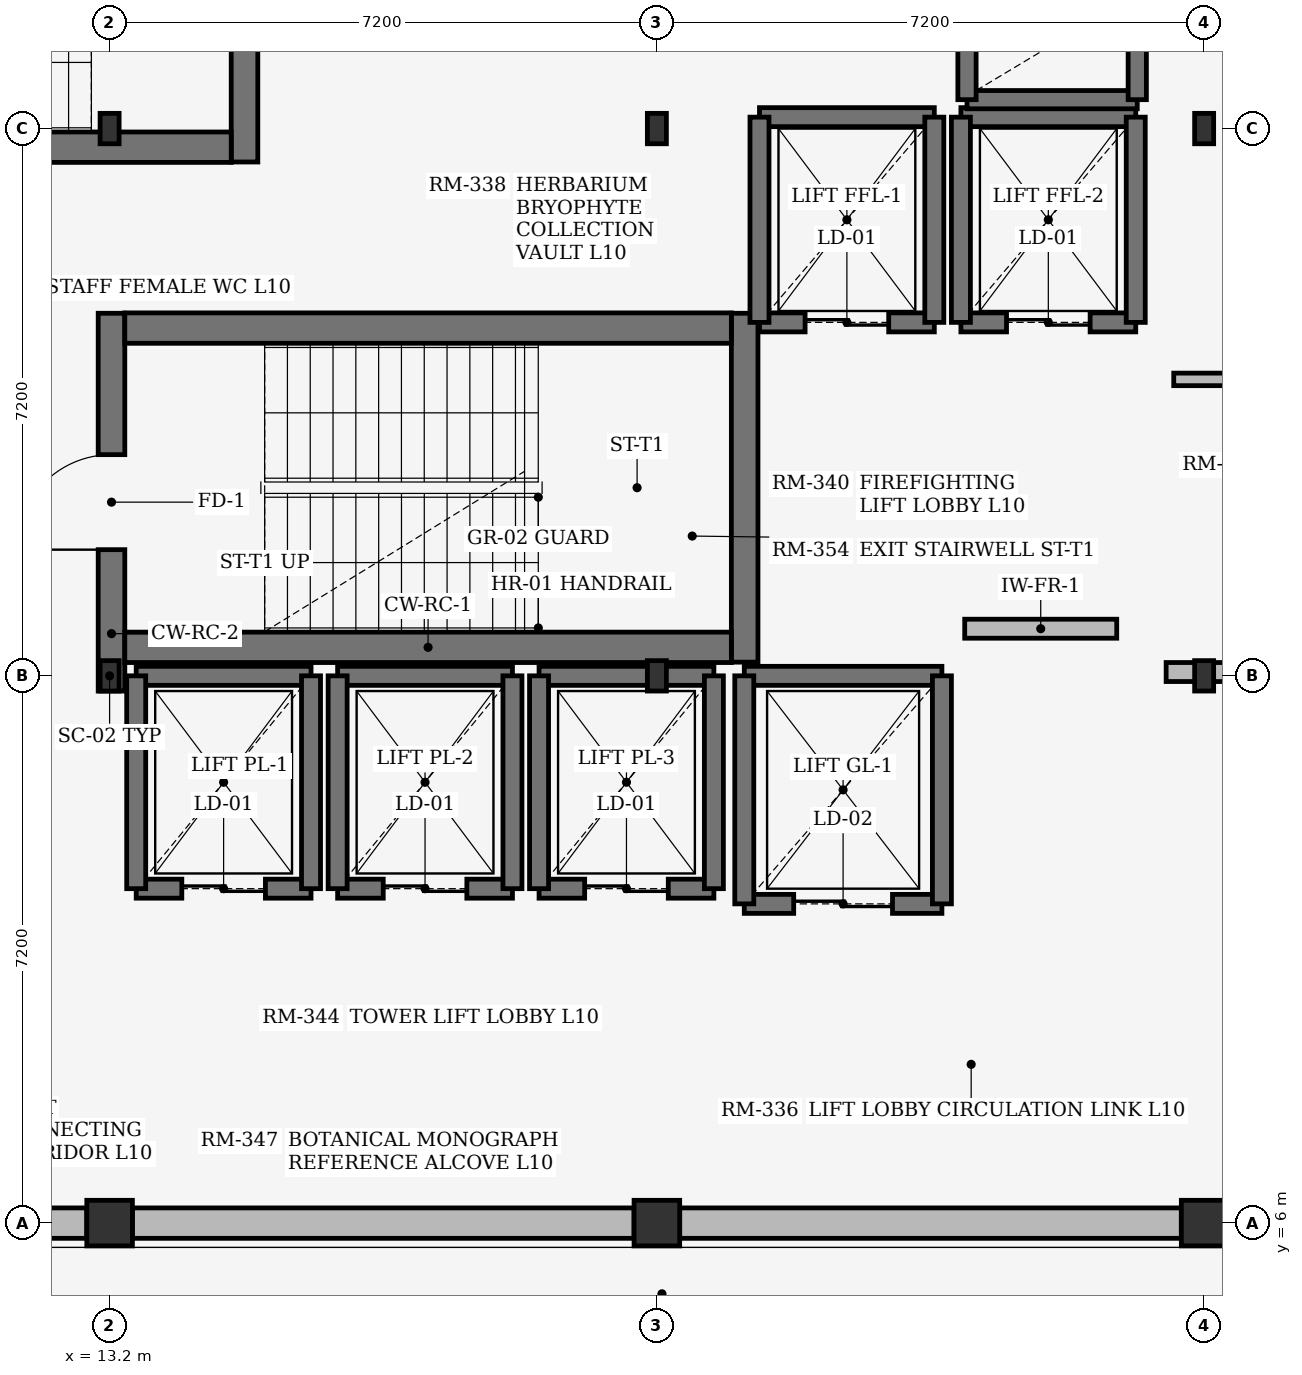
"""IFC4 building model, lengths in metres.
Left out: names, types, materials, properties, quantities, classifications, styles, units other than length and angle.
Written with IfcOpenShell. Run it as: python <this file> out.ifc"""

import sys

from ifc_helpers import new_model, si_unit, direction, frame, frame_2d, origin, origin_2d, place, context, subcontext, project, spatial, rectangle, i_section, extrude, element, fill, save


model = new_model("IFC4")
c1 = context("Model", 3, precision=1e-05, world=origin(), true_north=direction((0.0, 1.0)))
c2 = subcontext(c1, "Body", "Model", "MODEL_VIEW")
j1 = project(units=[si_unit("LENGTHUNIT", "METRE"), si_unit("PLANEANGLEUNIT", "RADIAN")], contexts=[c1])
p1 = place(None, origin())
s1 = spatial("IfcSite", under=j1, at=p1, CompositionType="ELEMENT")
p2 = place(p1, origin())
s2 = spatial("IfcBuilding", under=s1, at=p2, CompositionType="ELEMENT")
p3 = place(p2, frame((0.0, 0.0, 40.5)))
s3 = spatial("IfcBuildingStorey", under=s2, at=p3, CompositionType="ELEMENT", Elevation=40.5)
p4 = place(p3, frame((13.2, 6.0, 0.0), z_axis=(0.0, 0.0, 1.0), x_axis=(1.0, 0.0, 0.0)))
e1 = element("IfcColumn", 1, at=p4, inside=s3, PredefinedType="COLUMN", context=c2, shape_type="SweptSolid", body=[
    extrude(rectangle(XDim=0.6, YDim=0.6, at=origin_2d()), origin(), (0.0, 0.0, 1.0), 3.68),
])
for number, where, z_axis, x_axis in (
    (2, (13.2, 13.2, 0.0), (0.0, 0.0, 1.0), (1.0, 0.0, 0.0)),
    (3, (13.2, 20.4, 0.0), (0.0, 0.0, 1.0), (1.0, 0.0, 0.0)),
):
    element("IfcColumn", number, at=place(p3, frame(where, z_axis=z_axis, x_axis=x_axis)), inside=s3, PredefinedType="COLUMN", context=c2, shape_type="SweptSolid", body=[
        extrude(i_section(OverallWidth=0.25, OverallDepth=0.4, WebThickness=0.01, FlangeThickness=0.013, at=origin_2d()), origin(), (0.0, 0.0, 1.0), 3.68),
    ])
p5 = place(p3, frame((20.4, 6.0, 0.0), z_axis=(0.0, 0.0, 1.0), x_axis=(1.0, 0.0, 0.0)))
e4 = element("IfcColumn", 4, at=p5, inside=s3, PredefinedType="COLUMN", context=c2, shape_type="SweptSolid", body=[
    extrude(rectangle(XDim=0.6, YDim=0.6, at=origin_2d()), origin(), (0.0, 0.0, 1.0), 3.68),
])
for number, where, z_axis, x_axis in (
    (5, (20.4, 13.2, 0.0), (0.0, 0.0, 1.0), (1.0, 0.0, 0.0)),
    (6, (20.4, 20.4, 0.0), (0.0, 0.0, 1.0), (1.0, 0.0, 0.0)),
):
    element("IfcColumn", number, at=place(p3, frame(where, z_axis=z_axis, x_axis=x_axis)), inside=s3, PredefinedType="COLUMN", context=c2, shape_type="SweptSolid", body=[
        extrude(i_section(OverallWidth=0.25, OverallDepth=0.4, WebThickness=0.01, FlangeThickness=0.013, at=origin_2d()), origin(), (0.0, 0.0, 1.0), 3.68),
    ])
p6 = place(p3, frame((27.6, 6.0, 0.0), z_axis=(0.0, 0.0, 1.0), x_axis=(1.0, 0.0, 0.0)))
e7 = element("IfcColumn", 7, at=p6, inside=s3, PredefinedType="COLUMN", context=c2, shape_type="SweptSolid", body=[
    extrude(rectangle(XDim=0.6, YDim=0.6, at=origin_2d()), origin(), (0.0, 0.0, 1.0), 3.68),
])
for number, where, z_axis, x_axis in (
    (8, (27.6, 13.2, 0.0), (0.0, 0.0, 1.0), (1.0, 0.0, 0.0)),
    (9, (27.6, 20.4, 0.0), (0.0, 0.0, 1.0), (1.0, 0.0, 0.0)),
):
    element("IfcColumn", number, at=place(p3, frame(where, z_axis=z_axis, x_axis=x_axis)), inside=s3, PredefinedType="COLUMN", context=c2, shape_type="SweptSolid", body=[
        extrude(i_section(OverallWidth=0.25, OverallDepth=0.4, WebThickness=0.01, FlangeThickness=0.013, at=origin_2d()), origin(), (0.0, 0.0, 1.0), 3.68),
    ])
p7 = place(p3, frame((6.3, 6.0, 0.0), z_axis=(0.0, 0.0, 1.0), x_axis=(1.0, 0.0, 0.0)))
e10 = element("IfcWall", 10, at=p7, inside=s3, PredefinedType="STANDARD", context=c2, shape_type="SweptSolid", body=[
    extrude(rectangle(XDim=6.6, YDim=0.4, at=frame_2d((3.3, 0.0))), origin(), (0.0, 0.0, 1.0), 3.16),
])
for number, where, z_axis, x_axis in (
    (11, (13.5, 6.0, 0.0), (0.0, 0.0, 1.0), (1.0, 0.0, 0.0)),
    (12, (20.7, 6.0, 0.0), (0.0, 0.0, 1.0), (1.0, 0.0, 0.0)),
):
    element("IfcWall", number, at=place(p3, frame(where, z_axis=z_axis, x_axis=x_axis)), inside=s3, PredefinedType="STANDARD", context=c2, shape_type="SweptSolid", body=[
        extrude(rectangle(XDim=6.6, YDim=0.4, at=frame_2d((3.3, 0.0))), origin(), (0.0, 0.0, 1.0), 3.16),
    ])
p8 = place(p3, frame((13.225, 13.0, 0.0), z_axis=(0.0, 0.0, 1.0), x_axis=(0.0, 1.0, 0.0)))
e13 = element("IfcWall", 13, at=p8, inside=s3, PredefinedType="SHEAR", context=c2, shape_type="SweptSolid", body=[
    extrude(rectangle(XDim=4.97, YDim=0.35, at=frame_2d((2.485, 0.0))), origin(), (0.0, 0.0, 1.0), 3.68),
])
p9 = place(p8, frame((1.86, 0.0, 0.0)))
e14 = element("IfcOpeningElement", 14, at=p9, cuts=e13, PredefinedType="OPENING", context=c2, shape_type="SweptSolid", body=[
    extrude(rectangle(XDim=1.25, YDim=2.2, at=frame_2d((0.625, 1.1))), frame((0.0, 0.185, 0.0), z_axis=(0.0, -1.0, 0.0), x_axis=(1.0, 0.0, 0.0)), (0.0, 0.0, 1.0), 0.37),
])
p10 = place(p3, frame((21.555, 13.38, 0.0), z_axis=(0.0, 0.0, 1.0), x_axis=(0.0, 1.0, 0.0)))
e15 = element("IfcWall", 15, at=p10, inside=s3, PredefinedType="SHEAR", context=c2, shape_type="SweptSolid", body=[
    extrude(rectangle(XDim=4.59, YDim=0.35, at=frame_2d((2.295, 0.0))), origin(), (0.0, 0.0, 1.0), 3.68),
])
for number, where, z_axis, x_axis in (
    (16, (13.4, 13.575, 0.0), (0.0, 0.0, 1.0), (1.0, 0.0, 0.0)),
    (17, (13.4, 17.775, 0.0), (0.0, 0.0, 1.0), (1.0, 0.0, 0.0)),
):
    element("IfcWall", number, at=place(p3, frame(where, z_axis=z_axis, x_axis=x_axis)), inside=s3, PredefinedType="SHEAR", context=c2, shape_type="SweptSolid", body=[
        extrude(rectangle(XDim=7.98, YDim=0.4, at=frame_2d((3.99, 0.0))), origin(), (0.0, 0.0, 1.0), 3.68),
    ])
p11 = place(p3, frame((14.975, 24.55, 0.0), z_axis=(0.0, 0.0, 1.0), x_axis=(0.0, -1.0, 0.0)))
e18 = element("IfcWall", 18, at=p11, inside=s3, PredefinedType="SHEAR", context=c2, shape_type="SweptSolid", body=[
    extrude(rectangle(XDim=4.59, YDim=0.35, at=frame_2d((2.295, 0.0))), origin(), (0.0, 0.0, 1.0), 3.68),
])
p12 = place(p11, frame((1.72, 0.0, 0.0)))
e19 = element("IfcOpeningElement", 19, at=p12, cuts=e18, PredefinedType="OPENING", context=c2, shape_type="SweptSolid", body=[
    extrude(rectangle(XDim=1.15, YDim=2.2, at=frame_2d((0.575, 1.1))), frame((0.0, 0.185, 0.0), z_axis=(0.0, -1.0, 0.0), x_axis=(1.0, 0.0, 0.0)), (0.0, 0.0, 1.0), 0.37),
])
p13 = place(p3, frame((14.8, 20.155, 0.0), z_axis=(0.0, 0.0, 1.0), x_axis=(-1.0, 0.0, 0.0)))
e20 = element("IfcWall", 20, at=p13, inside=s3, PredefinedType="SHEAR", context=c2, shape_type="SweptSolid", body=[
    extrude(rectangle(XDim=7.98, YDim=0.4, at=frame_2d((3.99, 0.0))), origin(), (0.0, 0.0, 1.0), 3.68),
])
p14 = place(p3, frame((21.75, 17.85, 0.0), z_axis=(0.0, 0.0, 1.0), x_axis=(1.0, 0.0, 0.0)))
e21 = element("IfcWall", 21, at=p14, inside=s3, PredefinedType="SHEAR", context=c2, shape_type="SweptSolid", body=[
    extrude(rectangle(XDim=2.3, YDim=0.25, at=frame_2d((1.15, 0.0))), origin(), (0.0, 0.0, 1.0), 3.68),
])
p15 = place(p14, frame((0.6, 0.0, 0.0)))
e22 = element("IfcOpeningElement", 22, at=p15, cuts=e21, PredefinedType="OPENING", context=c2, shape_type="SweptSolid", body=[
    extrude(rectangle(XDim=1.1, YDim=2.2, at=frame_2d((0.55, 1.1))), frame((0.0, 0.135, 0.0), z_axis=(0.0, -1.0, 0.0), x_axis=(1.0, 0.0, 0.0)), (0.0, 0.0, 1.0), 0.27),
])
p16 = place(p3, frame((21.75, 20.55, 0.0), z_axis=(0.0, 0.0, 1.0), x_axis=(1.0, 0.0, 0.0)))
e23 = element("IfcWall", 23, at=p16, inside=s3, PredefinedType="SHEAR", context=c2, shape_type="SweptSolid", body=[
    extrude(rectangle(XDim=2.3, YDim=0.25, at=frame_2d((1.15, 0.0))), origin(), (0.0, 0.0, 1.0), 3.68),
])
for number, where, z_axis, x_axis in (
    (24, (21.75, 17.85, 0.0), (0.0, 0.0, 1.0), (0.0, 1.0, 0.0)),
    (25, (24.05, 17.85, 0.0), (0.0, 0.0, 1.0), (0.0, 1.0, 0.0)),
):
    element("IfcWall", number, at=place(p3, frame(where, z_axis=z_axis, x_axis=x_axis)), inside=s3, PredefinedType="SHEAR", context=c2, shape_type="SweptSolid", body=[
        extrude(rectangle(XDim=2.7, YDim=0.25, at=frame_2d((1.35, 0.0))), origin(), (0.0, 0.0, 1.0), 3.68),
    ])
p17 = place(p3, frame((24.4, 17.85, 0.0), z_axis=(0.0, 0.0, 1.0), x_axis=(1.0, 0.0, 0.0)))
e26 = element("IfcWall", 26, at=p17, inside=s3, PredefinedType="SHEAR", context=c2, shape_type="SweptSolid", body=[
    extrude(rectangle(XDim=2.3, YDim=0.25, at=frame_2d((1.15, 0.0))), origin(), (0.0, 0.0, 1.0), 3.68),
])
p18 = place(p17, frame((0.6, 0.0, 0.0)))
e27 = element("IfcOpeningElement", 27, at=p18, cuts=e26, PredefinedType="OPENING", context=c2, shape_type="SweptSolid", body=[
    extrude(rectangle(XDim=1.1, YDim=2.2, at=frame_2d((0.55, 1.1))), frame((0.0, 0.135, 0.0), z_axis=(0.0, -1.0, 0.0), x_axis=(1.0, 0.0, 0.0)), (0.0, 0.0, 1.0), 0.27),
])
p19 = place(p3, frame((24.4, 20.55, 0.0), z_axis=(0.0, 0.0, 1.0), x_axis=(1.0, 0.0, 0.0)))
e28 = element("IfcWall", 28, at=p19, inside=s3, PredefinedType="SHEAR", context=c2, shape_type="SweptSolid", body=[
    extrude(rectangle(XDim=2.3, YDim=0.25, at=frame_2d((1.15, 0.0))), origin(), (0.0, 0.0, 1.0), 3.68),
])
for number, where, z_axis, x_axis in (
    (29, (24.4, 17.85, 0.0), (0.0, 0.0, 1.0), (0.0, 1.0, 0.0)),
    (30, (26.7, 17.85, 0.0), (0.0, 0.0, 1.0), (0.0, 1.0, 0.0)),
):
    element("IfcWall", number, at=place(p3, frame(where, z_axis=z_axis, x_axis=x_axis)), inside=s3, PredefinedType="SHEAR", context=c2, shape_type="SweptSolid", body=[
        extrude(rectangle(XDim=2.7, YDim=0.25, at=frame_2d((1.35, 0.0))), origin(), (0.0, 0.0, 1.0), 3.68),
    ])
p20 = place(p3, frame((13.55, 10.4, 0.0), z_axis=(0.0, 0.0, 1.0), x_axis=(1.0, 0.0, 0.0)))
e31 = element("IfcWall", 31, at=p20, inside=s3, PredefinedType="SHEAR", context=c2, shape_type="SweptSolid", body=[
    extrude(rectangle(XDim=2.3, YDim=0.25, at=frame_2d((1.15, 0.0))), origin(), (0.0, 0.0, 1.0), 3.68),
])
p21 = place(p20, frame((0.6, 0.0, 0.0)))
e32 = element("IfcOpeningElement", 32, at=p21, cuts=e31, PredefinedType="OPENING", context=c2, shape_type="SweptSolid", body=[
    extrude(rectangle(XDim=1.1, YDim=2.2, at=frame_2d((0.55, 1.1))), frame((0.0, 0.135, 0.0), z_axis=(0.0, -1.0, 0.0), x_axis=(1.0, 0.0, 0.0)), (0.0, 0.0, 1.0), 0.27),
])
p22 = place(p3, frame((13.55, 13.2, 0.0), z_axis=(0.0, 0.0, 1.0), x_axis=(1.0, 0.0, 0.0)))
e33 = element("IfcWall", 33, at=p22, inside=s3, PredefinedType="SHEAR", context=c2, shape_type="SweptSolid", body=[
    extrude(rectangle(XDim=2.3, YDim=0.25, at=frame_2d((1.15, 0.0))), origin(), (0.0, 0.0, 1.0), 3.68),
])
for number, where, z_axis, x_axis in (
    (34, (13.55, 10.4, 0.0), (0.0, 0.0, 1.0), (0.0, 1.0, 0.0)),
    (35, (15.85, 10.4, 0.0), (0.0, 0.0, 1.0), (0.0, 1.0, 0.0)),
):
    element("IfcWall", number, at=place(p3, frame(where, z_axis=z_axis, x_axis=x_axis)), inside=s3, PredefinedType="SHEAR", context=c2, shape_type="SweptSolid", body=[
        extrude(rectangle(XDim=2.8, YDim=0.25, at=frame_2d((1.4, 0.0))), origin(), (0.0, 0.0, 1.0), 3.68),
    ])
p23 = place(p3, frame((16.2, 10.4, 0.0), z_axis=(0.0, 0.0, 1.0), x_axis=(1.0, 0.0, 0.0)))
e36 = element("IfcWall", 36, at=p23, inside=s3, PredefinedType="SHEAR", context=c2, shape_type="SweptSolid", body=[
    extrude(rectangle(XDim=2.3, YDim=0.25, at=frame_2d((1.15, 0.0))), origin(), (0.0, 0.0, 1.0), 3.68),
])
p24 = place(p23, frame((0.6, 0.0, 0.0)))
e37 = element("IfcOpeningElement", 37, at=p24, cuts=e36, PredefinedType="OPENING", context=c2, shape_type="SweptSolid", body=[
    extrude(rectangle(XDim=1.1, YDim=2.2, at=frame_2d((0.55, 1.1))), frame((0.0, 0.135, 0.0), z_axis=(0.0, -1.0, 0.0), x_axis=(1.0, 0.0, 0.0)), (0.0, 0.0, 1.0), 0.27),
])
p25 = place(p3, frame((16.2, 13.2, 0.0), z_axis=(0.0, 0.0, 1.0), x_axis=(1.0, 0.0, 0.0)))
e38 = element("IfcWall", 38, at=p25, inside=s3, PredefinedType="SHEAR", context=c2, shape_type="SweptSolid", body=[
    extrude(rectangle(XDim=2.3, YDim=0.25, at=frame_2d((1.15, 0.0))), origin(), (0.0, 0.0, 1.0), 3.68),
])
for number, where, z_axis, x_axis in (
    (39, (16.2, 10.4, 0.0), (0.0, 0.0, 1.0), (0.0, 1.0, 0.0)),
    (40, (18.5, 10.4, 0.0), (0.0, 0.0, 1.0), (0.0, 1.0, 0.0)),
):
    element("IfcWall", number, at=place(p3, frame(where, z_axis=z_axis, x_axis=x_axis)), inside=s3, PredefinedType="SHEAR", context=c2, shape_type="SweptSolid", body=[
        extrude(rectangle(XDim=2.8, YDim=0.25, at=frame_2d((1.4, 0.0))), origin(), (0.0, 0.0, 1.0), 3.68),
    ])
p26 = place(p3, frame((18.85, 10.4, 0.0), z_axis=(0.0, 0.0, 1.0), x_axis=(1.0, 0.0, 0.0)))
e41 = element("IfcWall", 41, at=p26, inside=s3, PredefinedType="SHEAR", context=c2, shape_type="SweptSolid", body=[
    extrude(rectangle(XDim=2.3, YDim=0.25, at=frame_2d((1.15, 0.0))), origin(), (0.0, 0.0, 1.0), 3.68),
])
p27 = place(p26, frame((0.6, 0.0, 0.0)))
e42 = element("IfcOpeningElement", 42, at=p27, cuts=e41, PredefinedType="OPENING", context=c2, shape_type="SweptSolid", body=[
    extrude(rectangle(XDim=1.1, YDim=2.2, at=frame_2d((0.55, 1.1))), frame((0.0, 0.135, 0.0), z_axis=(0.0, -1.0, 0.0), x_axis=(1.0, 0.0, 0.0)), (0.0, 0.0, 1.0), 0.27),
])
p28 = place(p3, frame((18.85, 13.2, 0.0), z_axis=(0.0, 0.0, 1.0), x_axis=(1.0, 0.0, 0.0)))
e43 = element("IfcWall", 43, at=p28, inside=s3, PredefinedType="SHEAR", context=c2, shape_type="SweptSolid", body=[
    extrude(rectangle(XDim=2.3, YDim=0.25, at=frame_2d((1.15, 0.0))), origin(), (0.0, 0.0, 1.0), 3.68),
])
for number, where, z_axis, x_axis in (
    (44, (18.85, 10.4, 0.0), (0.0, 0.0, 1.0), (0.0, 1.0, 0.0)),
    (45, (21.15, 10.4, 0.0), (0.0, 0.0, 1.0), (0.0, 1.0, 0.0)),
):
    element("IfcWall", number, at=place(p3, frame(where, z_axis=z_axis, x_axis=x_axis)), inside=s3, PredefinedType="SHEAR", context=c2, shape_type="SweptSolid", body=[
        extrude(rectangle(XDim=2.8, YDim=0.25, at=frame_2d((1.4, 0.0))), origin(), (0.0, 0.0, 1.0), 3.68),
    ])
p29 = place(p3, frame((21.55, 10.2, 0.0), z_axis=(0.0, 0.0, 1.0), x_axis=(1.0, 0.0, 0.0)))
e46 = element("IfcWall", 46, at=p29, inside=s3, PredefinedType="SHEAR", context=c2, shape_type="SweptSolid", body=[
    extrude(rectangle(XDim=2.6, YDim=0.25, at=frame_2d((1.3, 0.0))), origin(), (0.0, 0.0, 1.0), 3.68),
])
p30 = place(p29, frame((0.65, 0.0, 0.0)))
e47 = element("IfcOpeningElement", 47, at=p30, cuts=e46, PredefinedType="OPENING", context=c2, shape_type="SweptSolid", body=[
    extrude(rectangle(XDim=1.3, YDim=2.25, at=frame_2d((0.65, 1.125))), frame((0.0, 0.135, 0.0), z_axis=(0.0, -1.0, 0.0), x_axis=(1.0, 0.0, 0.0)), (0.0, 0.0, 1.0), 0.27),
])
p31 = place(p3, frame((21.55, 13.2, 0.0), z_axis=(0.0, 0.0, 1.0), x_axis=(1.0, 0.0, 0.0)))
e48 = element("IfcWall", 48, at=p31, inside=s3, PredefinedType="SHEAR", context=c2, shape_type="SweptSolid", body=[
    extrude(rectangle(XDim=2.6, YDim=0.25, at=frame_2d((1.3, 0.0))), origin(), (0.0, 0.0, 1.0), 3.68),
])
for number, where, z_axis, x_axis in (
    (49, (21.55, 10.2, 0.0), (0.0, 0.0, 1.0), (0.0, 1.0, 0.0)),
    (50, (24.15, 10.2, 0.0), (0.0, 0.0, 1.0), (0.0, 1.0, 0.0)),
):
    element("IfcWall", number, at=place(p3, frame(where, z_axis=z_axis, x_axis=x_axis)), inside=s3, PredefinedType="SHEAR", context=c2, shape_type="SweptSolid", body=[
        extrude(rectangle(XDim=3.0, YDim=0.25, at=frame_2d((1.5, 0.0))), origin(), (0.0, 0.0, 1.0), 3.68),
    ])
p32 = place(p3, frame((24.48, 20.78, 0.0), z_axis=(0.0, 0.0, 1.0), x_axis=(1.0, 0.0, 0.0)))
e51 = element("IfcWall", 51, at=p32, inside=s3, PredefinedType="SHEAR", context=c2, shape_type="SweptSolid", body=[
    extrude(rectangle(XDim=2.24, YDim=0.24, at=frame_2d((1.12, 0.0))), origin(), (0.0, 0.0, 1.0), 3.68),
])
for number, where, z_axis, x_axis in (
    (52, (24.48, 20.78, 0.0), (0.0, 0.0, 1.0), (0.0, 1.0, 0.0)),
    (53, (26.72, 20.78, 0.0), (0.0, 0.0, 1.0), (0.0, 1.0, 0.0)),
):
    element("IfcWall", number, at=place(p3, frame(where, z_axis=z_axis, x_axis=x_axis)), inside=s3, PredefinedType="SHEAR", context=c2, shape_type="SweptSolid", body=[
        extrude(rectangle(XDim=2.94, YDim=0.24, at=frame_2d((1.47, 0.0))), origin(), (0.0, 0.0, 1.0), 3.68),
    ])
p33 = place(p3, frame((24.45, 13.82, 0.0), z_axis=(0.0, 0.0, 1.0), x_axis=(1.0, 0.0, 0.0)))
e54 = element("IfcWall", 54, at=p33, inside=s3, PredefinedType="SOLIDWALL", context=c2, shape_type="SweptSolid", body=[
    extrude(rectangle(XDim=2.0, YDim=0.25, at=frame_2d((1.0, 0.0))), origin(), (0.0, 0.0, 1.0), 3.66),
])
p34 = place(p3, frame((27.2, 17.1, 0.0), z_axis=(0.0, 0.0, 1.0), x_axis=(1.0, 0.0, 0.0)))
e55 = element("IfcWall", 55, at=p34, inside=s3, PredefinedType="PARTITIONING", context=c2, shape_type="SweptSolid", body=[
    extrude(rectangle(XDim=7.05, YDim=0.165, at=frame_2d((3.525, 0.0))), origin(), (0.0, 0.0, 1.0), 3.66),
])
p35 = place(p34, frame((2.715, 0.0, 0.0)))
e56 = element("IfcOpeningElement", 56, at=p35, cuts=e55, PredefinedType="OPENING", context=c2, shape_type="SweptSolid", body=[
    extrude(rectangle(XDim=1.62, YDim=2.28, at=frame_2d((0.81, 1.14))), frame((0.0, 0.093, 0.0), z_axis=(0.0, -1.0, 0.0), x_axis=(1.0, 0.0, 0.0)), (0.0, 0.0, 1.0), 0.185),
])
p36 = place(p3, frame((27.1, 13.25, 0.0), z_axis=(0.0, 0.0, 1.0), x_axis=(1.0, 0.0, 0.0)))
e57 = element("IfcWall", 57, at=p36, inside=s3, PredefinedType="SOLIDWALL", context=c2, shape_type="SweptSolid", body=[
    extrude(rectangle(XDim=7.4, YDim=0.25, at=frame_2d((3.7, 0.0))), origin(), (0.0, 0.0, 1.0), 3.17),
])
p37 = place(p36, frame((2.8, 0.0, 0.0)))
e58 = element("IfcOpeningElement", 58, at=p37, cuts=e57, PredefinedType="OPENING", context=c2, shape_type="SweptSolid", body=[
    extrude(rectangle(XDim=1.8, YDim=2.25, at=frame_2d((0.9, 1.125))), frame((0.0, 0.135, 0.0), z_axis=(0.0, -1.0, 0.0), x_axis=(1.0, 0.0, 0.0)), (0.0, 0.0, 1.0), 0.27),
])
p38 = place(p9, origin())
e59 = element("IfcDoor", 59, at=p38, inside=s3, OperationType="SINGLE_SWING_LEFT", PredefinedType="DOOR", context=c2, shape_type="SweptSolid", body=[
    extrude(rectangle(XDim=1.25, YDim=2.2, at=frame_2d((0.625, 1.1))), frame((0.0, 0.025, 0.0), z_axis=(0.0, -1.0, 0.0), x_axis=(1.0, 0.0, 0.0)), (0.0, 0.0, 1.0), 0.05),
])
fill(e14, e59)
p39 = place(p15, origin())
e60 = element("IfcDoor", 60, at=p39, inside=s3, OperationType="DOUBLE_DOOR_SLIDING", PredefinedType="DOOR", context=c2, shape_type="SweptSolid", body=[
    extrude(rectangle(XDim=1.1, YDim=2.2, at=frame_2d((0.55, 1.1))), frame((0.0, 0.025, 0.0), z_axis=(0.0, -1.0, 0.0), x_axis=(1.0, 0.0, 0.0)), (0.0, 0.0, 1.0), 0.05),
])
fill(e22, e60)
p40 = place(p18, origin())
e61 = element("IfcDoor", 61, at=p40, inside=s3, OperationType="DOUBLE_DOOR_SLIDING", PredefinedType="DOOR", context=c2, shape_type="SweptSolid", body=[
    extrude(rectangle(XDim=1.1, YDim=2.2, at=frame_2d((0.55, 1.1))), frame((0.0, 0.025, 0.0), z_axis=(0.0, -1.0, 0.0), x_axis=(1.0, 0.0, 0.0)), (0.0, 0.0, 1.0), 0.05),
])
fill(e27, e61)
p41 = place(p21, origin())
e62 = element("IfcDoor", 62, at=p41, inside=s3, OperationType="DOUBLE_DOOR_SLIDING", PredefinedType="DOOR", context=c2, shape_type="SweptSolid", body=[
    extrude(rectangle(XDim=1.1, YDim=2.2, at=frame_2d((0.55, 1.1))), frame((0.0, 0.025, 0.0), z_axis=(0.0, -1.0, 0.0), x_axis=(1.0, 0.0, 0.0)), (0.0, 0.0, 1.0), 0.05),
])
fill(e32, e62)
p42 = place(p24, origin())
e63 = element("IfcDoor", 63, at=p42, inside=s3, OperationType="DOUBLE_DOOR_SLIDING", PredefinedType="DOOR", context=c2, shape_type="SweptSolid", body=[
    extrude(rectangle(XDim=1.1, YDim=2.2, at=frame_2d((0.55, 1.1))), frame((0.0, 0.025, 0.0), z_axis=(0.0, -1.0, 0.0), x_axis=(1.0, 0.0, 0.0)), (0.0, 0.0, 1.0), 0.05),
])
fill(e37, e63)
p43 = place(p27, origin())
e64 = element("IfcDoor", 64, at=p43, inside=s3, OperationType="DOUBLE_DOOR_SLIDING", PredefinedType="DOOR", context=c2, shape_type="SweptSolid", body=[
    extrude(rectangle(XDim=1.1, YDim=2.2, at=frame_2d((0.55, 1.1))), frame((0.0, 0.025, 0.0), z_axis=(0.0, -1.0, 0.0), x_axis=(1.0, 0.0, 0.0)), (0.0, 0.0, 1.0), 0.05),
])
fill(e42, e64)
p44 = place(p30, origin())
e65 = element("IfcDoor", 65, at=p44, inside=s3, OperationType="DOUBLE_DOOR_SLIDING", PredefinedType="DOOR", context=c2, shape_type="SweptSolid", body=[
    extrude(rectangle(XDim=1.3, YDim=2.25, at=frame_2d((0.65, 1.125))), frame((0.0, 0.025, 0.0), z_axis=(0.0, -1.0, 0.0), x_axis=(1.0, 0.0, 0.0)), (0.0, 0.0, 1.0), 0.05),
])
fill(e47, e65)
save(model, sys.argv[1])
